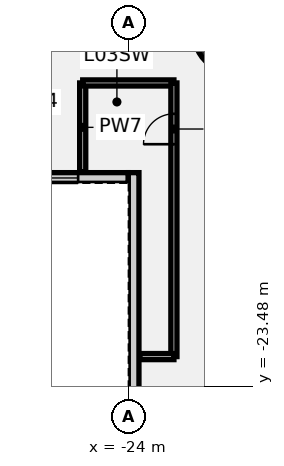
"""IFC4 building model, lengths in metres.
Left out: names, types, materials, properties, quantities, classifications, styles, units other than length and angle.
Written with IfcOpenShell. Run it as: python <this file> out.ifc"""

import sys

from ifc_helpers import new_model, si_unit, direction, frame, frame_2d, origin, origin_2d, place, context, subcontext, project, spatial, rectangle, circle, extrude, element, fill, save


model = new_model("IFC4")
c1 = context("Model", 3, precision=1e-05, world=origin(), true_north=direction((0.0, 1.0)))
c2 = subcontext(c1, "Body", "Model", "MODEL_VIEW")
j1 = project(units=[si_unit("LENGTHUNIT", "METRE"), si_unit("PLANEANGLEUNIT", "RADIAN")], contexts=[c1])
p1 = place(None, origin())
s1 = spatial("IfcSite", under=j1, at=p1, CompositionType="ELEMENT")
p2 = place(p1, origin())
s2 = spatial("IfcBuilding", under=s1, at=p2, CompositionType="ELEMENT")
p3 = place(p2, frame((0.0, 0.0, 20.0)))
s3 = spatial("IfcBuildingStorey", under=s2, at=p3, CompositionType="ELEMENT", Elevation=20.0)
p4 = place(p3, frame((-20.543, -11.86, -0.5), z_axis=(0.0, 0.0, 1.0), x_axis=(1.0, 0.0, 0.0)))
e1 = element("IfcColumn", 1, at=p4, inside=s3, PredefinedType="COLUMN", context=c2, shape_type="SweptSolid", body=[
    extrude(circle(Radius=1.3, at=origin_2d()), origin(), (0.0, 0.0, 1.0), 5.05),
])
p5 = place(p3, frame((-25.5, -16.42, 0.0), z_axis=(0.0, 0.0, 1.0), x_axis=(0.0, 1.0, 0.0)))
e2 = element("IfcWall", 2, at=p5, inside=s3, PredefinedType="PARTITIONING", context=c2, shape_type="SweptSolid", body=[
    extrude(rectangle(XDim=2.92, YDim=0.2, at=frame_2d((1.46, 0.0))), origin(), (0.0, 0.0, 1.0), 4.55),
])
p6 = place(p3, frame((-25.5, -13.5, 0.0), z_axis=(0.0, 0.0, 1.0), x_axis=(1.0, 0.0, 0.0)))
e3 = element("IfcWall", 3, at=p6, inside=s3, PredefinedType="PARTITIONING", context=c2, shape_type="SweptSolid", body=[
    extrude(rectangle(XDim=3.0, YDim=0.2, at=frame_2d((1.5, 0.0))), origin(), (0.0, 0.0, 1.0), 4.55),
])
p7 = place(p3, frame((-22.5, -22.5, 0.0), z_axis=(0.0, 0.0, 1.0), x_axis=(0.0, 1.0, 0.0)))
e4 = element("IfcWall", 4, at=p7, inside=s3, PredefinedType="PARTITIONING", context=c2, shape_type="SweptSolid", body=[
    extrude(rectangle(XDim=9.0, YDim=0.2, at=frame_2d((4.5, 0.0))), origin(), (0.0, 0.0, 1.0), 4.55),
])
p8 = place(p7, frame((6.985, 0.0, 0.0)))
e5 = element("IfcOpeningElement", 5, at=p8, cuts=e4, PredefinedType="OPENING", context=c2, shape_type="SweptSolid", body=[
    extrude(rectangle(XDim=1.0, YDim=2.1, at=frame_2d((0.5, 1.05))), frame((0.0, 0.11, 0.0), z_axis=(0.0, -1.0, 0.0), x_axis=(1.0, 0.0, 0.0)), (0.0, 0.0, 1.0), 0.22),
])
p9 = place(p3, frame((-23.62, -22.5, 0.0), z_axis=(0.0, 0.0, 1.0), x_axis=(1.0, 0.0, 0.0)))
e6 = element("IfcWall", 6, at=p9, inside=s3, PredefinedType="PARTITIONING", context=c2, shape_type="SweptSolid", body=[
    extrude(rectangle(XDim=1.12, YDim=0.2, at=frame_2d((0.56, 0.0))), origin(), (0.0, 0.0, 1.0), 4.55),
])
p10 = place(p3, frame((-42.0, -16.625, 0.0), z_axis=(0.0, 0.0, 1.0), x_axis=(1.0, 0.0, 0.0)))
e7 = element("IfcWall", 7, at=p10, inside=s3, PredefinedType="SOLIDWALL", context=c2, shape_type="SweptSolid", body=[
    extrude(rectangle(XDim=18.0, YDim=0.35, at=frame_2d((9.0, 0.0))), origin(), (0.0, 0.0, 1.0), 4.55),
])
p11 = place(p10, frame((13.95, 0.0, 1.0)))
e8 = element("IfcOpeningElement", 8, at=p11, cuts=e7, PredefinedType="OPENING", context=c2, shape_type="SweptSolid", body=[
    extrude(rectangle(XDim=2.4, YDim=1.8, at=frame_2d((1.2, 0.9))), frame((0.0, 0.185, 0.0), z_axis=(0.0, -1.0, 0.0), x_axis=(1.0, 0.0, 0.0)), (0.0, 0.0, 1.0), 0.37),
])
p12 = place(p3, frame((-23.825, -43.85, 0.0), z_axis=(0.0, 0.0, 1.0), x_axis=(0.0, 1.0, 0.0)))
e9 = element("IfcWall", 9, at=p12, inside=s3, PredefinedType="SOLIDWALL", context=c2, shape_type="SweptSolid", body=[
    extrude(rectangle(XDim=27.4, YDim=0.35, at=frame_2d((13.7, 0.0))), origin(), (0.0, 0.0, 1.0), 4.55),
])
p13 = place(p12, frame((14.9, 0.0, 1.0)))
e10 = element("IfcOpeningElement", 10, at=p13, cuts=e9, PredefinedType="OPENING", context=c2, shape_type="SweptSolid", body=[
    extrude(rectangle(XDim=2.4, YDim=1.8, at=frame_2d((1.2, 0.9))), frame((0.0, 0.185, 0.0), z_axis=(0.0, -1.0, 0.0), x_axis=(1.0, 0.0, 0.0)), (0.0, 0.0, 1.0), 0.37),
])
p14 = place(p8, origin())
e11 = element("IfcDoor", 11, at=p14, inside=s3, OperationType="SINGLE_SWING_LEFT", PredefinedType="DOOR", context=c2, shape_type="SweptSolid", body=[
    extrude(rectangle(XDim=1.0, YDim=2.1, at=frame_2d((0.5, 1.05))), frame((0.0, 0.025, 0.0), z_axis=(0.0, -1.0, 0.0), x_axis=(1.0, 0.0, 0.0)), (0.0, 0.0, 1.0), 0.05),
])
fill(e5, e11)
p15 = place(p11, origin())
e12 = element("IfcWindow", 12, at=p15, inside=s3, PartitioningType="SINGLE_PANEL", PredefinedType="WINDOW", context=c2, shape_type="SweptSolid", body=[
    extrude(rectangle(XDim=2.4, YDim=1.8, at=frame_2d((1.2, 0.9))), frame((0.0, 0.03, 0.0), z_axis=(0.0, -1.0, 0.0), x_axis=(1.0, 0.0, 0.0)), (0.0, 0.0, 1.0), 0.06),
])
fill(e8, e12)
save(model, sys.argv[1])
